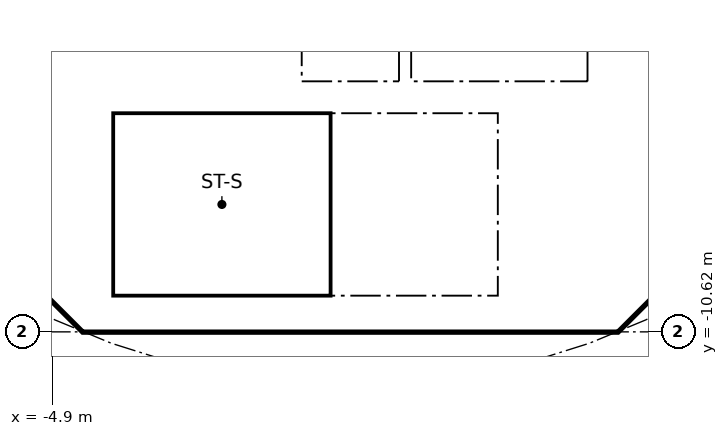
"""IFC4 building model, lengths in metres.
Left out: names, types, materials, properties, quantities, classifications, styles, units other than length and angle.
Written with IfcOpenShell. Run it as: python <this file> out.ifc"""

import sys

from ifc_helpers import new_model, si_unit, direction, frame, frame_2d, origin, place, context, subcontext, project, spatial, polyline, rectangle, outline, extrude, element, fill, save


model = new_model("IFC4")
c1 = context("Model", 3, precision=1e-05, world=origin(), true_north=direction((0.0, 1.0)))
c2 = subcontext(c1, "Body", "Model", "MODEL_VIEW")
j1 = project(units=[si_unit("LENGTHUNIT", "METRE"), si_unit("PLANEANGLEUNIT", "RADIAN")], contexts=[c1])
p1 = place(None, origin())
s1 = spatial("IfcSite", under=j1, at=p1, CompositionType="ELEMENT")
p2 = place(p1, origin())
s2 = spatial("IfcBuilding", under=s1, at=p2, CompositionType="ELEMENT")
p3 = place(p2, frame((0.0, 0.0, 195.5)))
s3 = spatial("IfcBuildingStorey", under=s2, at=p3, CompositionType="ELEMENT", Elevation=195.5)
p4 = place(p3, frame((-9.988, -4.613, 0.0), z_axis=(0.0, 0.0, 1.0), x_axis=(0.707106781187, -0.707106781187, 0.0)))
e1 = element("IfcWall", 1, at=p4, inside=s3, PredefinedType="SHEAR", context=c2, shape_type="SweptSolid", body=[
    extrude(rectangle(XDim=7.602, YDim=0.6, at=frame_2d((3.801, 0.0))), origin(), (0.0, 0.0, 1.0), 3.44),
])
p5 = place(p4, frame((6.151, 0.0, 0.0)))
e2 = element("IfcOpeningElement", 2, at=p5, cuts=e1, PredefinedType="OPENING", context=c2, shape_type="SweptSolid", body=[
    extrude(rectangle(XDim=1.1, YDim=2.1, at=frame_2d((0.55, 1.05))), frame((0.0, 0.31, 0.0), z_axis=(0.0, -1.0, 0.0), x_axis=(1.0, 0.0, 0.0)), (0.0, 0.0, 1.0), 0.62),
])
p6 = place(p3, frame((4.613, -9.988, 0.0), z_axis=(0.0, 0.0, 1.0), x_axis=(0.707106781187, 0.707106781187, 0.0)))
e3 = element("IfcWall", 3, at=p6, inside=s3, PredefinedType="SHEAR", context=c2, shape_type="SweptSolid", body=[
    extrude(rectangle(XDim=7.602, YDim=0.6, at=frame_2d((3.801, 0.0))), origin(), (0.0, 0.0, 1.0), 3.44),
])
p7 = place(p6, frame((3.201, 0.0, 0.0)))
e4 = element("IfcOpeningElement", 4, at=p7, cuts=e3, PredefinedType="OPENING", context=c2, shape_type="SweptSolid", body=[
    extrude(rectangle(XDim=1.2, YDim=2.1, at=frame_2d((0.6, 1.05))), frame((0.0, 0.31, 0.0), z_axis=(0.0, -1.0, 0.0), x_axis=(1.0, 0.0, 0.0)), (0.0, 0.0, 1.0), 0.62),
])
p8 = place(p3, frame((4.0, -10.025, 0.0), z_axis=(0.0, 0.0, 1.0), x_axis=(0.0, 1.0, 0.0)))
e5 = element("IfcWall", 5, at=p8, inside=s3, PredefinedType="SOLIDWALL", context=c2, shape_type="SweptSolid", body=[
    extrude(rectangle(XDim=3.0, YDim=0.2, at=frame_2d((1.5, 0.0))), origin(), (0.0, 0.0, 1.0), 3.44),
])
p9 = place(p8, frame((0.975, 0.0, 0.0)))
e6 = element("IfcOpeningElement", 6, at=p9, cuts=e5, PredefinedType="OPENING", context=c2, shape_type="SweptSolid", body=[
    extrude(rectangle(XDim=1.1, YDim=2.1, at=frame_2d((0.55, 1.05))), frame((0.0, 0.11, 0.0), z_axis=(0.0, -1.0, 0.0), x_axis=(1.0, 0.0, 0.0)), (0.0, 0.0, 1.0), 0.22),
])
p10 = place(p3, frame((4.0, -6.5, 0.0), z_axis=(0.0, 0.0, 1.0), x_axis=(0.0, 1.0, 0.0)))
e7 = element("IfcWall", 7, at=p10, inside=s3, PredefinedType="SOLIDWALL", context=c2, shape_type="SweptSolid", body=[
    extrude(rectangle(XDim=2.2, YDim=0.2, at=frame_2d((1.1, 0.0))), origin(), (0.0, 0.0, 1.0), 3.44),
])
p11 = place(p10, frame((0.55, 0.0, 0.0)))
e8 = element("IfcOpeningElement", 8, at=p11, cuts=e7, PredefinedType="OPENING", context=c2, shape_type="SweptSolid", body=[
    extrude(rectangle(XDim=1.1, YDim=2.1, at=frame_2d((0.55, 1.05))), frame((0.0, 0.11, 0.0), z_axis=(0.0, -1.0, 0.0), x_axis=(1.0, 0.0, 0.0)), (0.0, 0.0, 1.0), 0.22),
])
p12 = place(p3, frame((-4.0, -6.5, 0.0), z_axis=(0.0, 0.0, 1.0), x_axis=(0.0, 1.0, 0.0)))
e9 = element("IfcWall", 9, at=p12, inside=s3, PredefinedType="SOLIDWALL", context=c2, shape_type="SweptSolid", body=[
    extrude(rectangle(XDim=2.2, YDim=0.2, at=frame_2d((1.1, 0.0))), origin(), (0.0, 0.0, 1.0), 3.44),
])
p13 = place(p12, frame((0.65, 0.0, 0.0)))
e10 = element("IfcOpeningElement", 10, at=p13, cuts=e9, PredefinedType="OPENING", context=c2, shape_type="SweptSolid", body=[
    extrude(rectangle(XDim=0.9, YDim=2.1, at=frame_2d((0.45, 1.05))), frame((0.0, 0.11, 0.0), z_axis=(0.0, -1.0, 0.0), x_axis=(1.0, 0.0, 0.0)), (0.0, 0.0, 1.0), 0.22),
])
p14 = place(p3, origin())
e11 = element("IfcWall", 11, at=p14, inside=s3, PredefinedType="SHEAR", context=c2, shape_type="SweptSolid", body=[
    extrude(outline(polyline([(-4.152, -10.025), (4.152, -10.025), (4.401, -9.776), (4.825, -10.2), (4.401, -10.625), (-4.401, -10.625), (-4.825, -10.2), (-4.401, -9.776), (-4.152, -10.025)])), origin(), (0.0, 0.0, 1.0), 3.44),
])
for number, where, z_axis, x_axis in (
    (12, (-0.9, -6.5, 0.0), (0.0, 0.0, 1.0), (0.0, 1.0, 0.0)),
    (13, (0.9, -6.5, 0.0), (0.0, 0.0, 1.0), (0.0, 1.0, 0.0)),
):
    element("IfcWall", number, at=place(p3, frame(where, z_axis=z_axis, x_axis=x_axis)), inside=s3, PredefinedType="SOLIDWALL", context=c2, shape_type="SweptSolid", body=[
        extrude(rectangle(XDim=2.2, YDim=0.2, at=frame_2d((1.1, 0.0))), origin(), (0.0, 0.0, 1.0), 3.44),
    ])
p15 = place(p3, origin())
e14 = element("IfcWall", 14, at=p15, inside=s3, PredefinedType="SOLIDWALL", context=c2, shape_type="SweptSolid", body=[
    extrude(outline(polyline([(-3.9, -10.025), (-4.1, -10.025), (-4.1, -7.025), (-3.9, -7.025), (-3.9, -10.025)])), origin(), (0.0, 0.0, 1.0), 3.44),
])
p16 = place(p3, origin())
e15 = element("IfcWall", 15, at=p16, inside=s3, PredefinedType="SOLIDWALL", context=c2, shape_type="SweptSolid", body=[
    extrude(outline(polyline([(4.1, -7.025), (-4.1, -7.025), (-4.1, -6.5), (4.1, -6.5), (4.1, -7.025)])), origin(), (0.0, 0.0, 1.0), 3.44),
])
p17 = place(p9, origin())
e16 = element("IfcDoor", 16, at=p17, inside=s3, OperationType="SINGLE_SWING_LEFT", PredefinedType="DOOR", context=c2, shape_type="SweptSolid", body=[
    extrude(rectangle(XDim=1.1, YDim=2.1, at=frame_2d((0.55, 1.05))), frame((0.0, 0.025, 0.0), z_axis=(0.0, -1.0, 0.0), x_axis=(1.0, 0.0, 0.0)), (0.0, 0.0, 1.0), 0.05),
])
fill(e6, e16)
p18 = place(p5, origin())
e17 = element("IfcDoor", 17, at=p18, inside=s3, OperationType="SINGLE_SWING_RIGHT", PredefinedType="DOOR", context=c2, shape_type="SweptSolid", body=[
    extrude(rectangle(XDim=1.1, YDim=2.1, at=frame_2d((0.55, 1.05))), frame((0.0, 0.025, 0.0), z_axis=(0.0, -1.0, 0.0), x_axis=(1.0, 0.0, 0.0)), (0.0, 0.0, 1.0), 0.05),
])
fill(e2, e17)
save(model, sys.argv[1])
